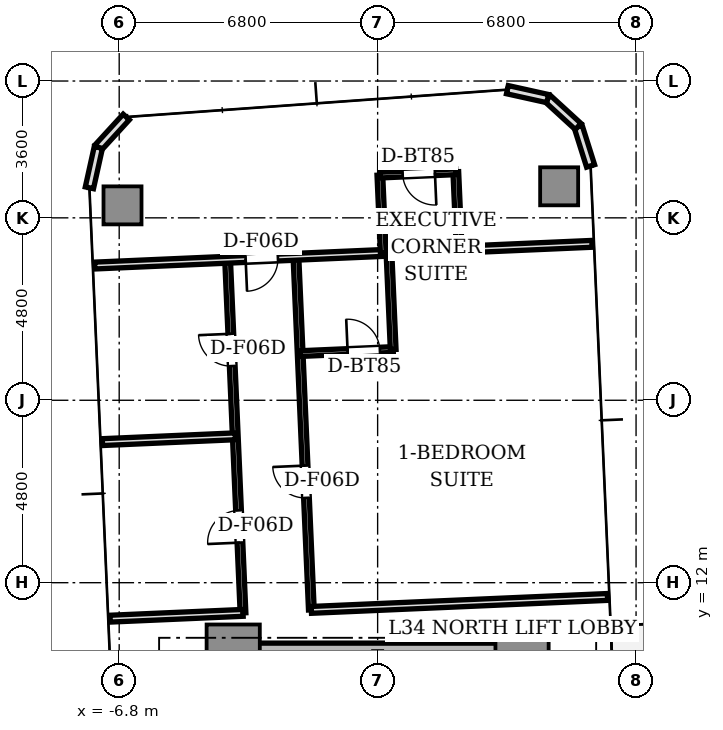
"""IFC4 building model, lengths in metres.
Left out: names, types, materials, properties, quantities, classifications, styles, units other than length and angle.
Written with IfcOpenShell. Run it as: python <this file> out.ifc"""

import sys

from ifc_helpers import new_model, si_unit, direction, frame, frame_2d, origin, origin_2d, place, context, subcontext, project, spatial, rectangle, extrude, source, transform, mapped, element, fill, save


model = new_model("IFC4")
c1 = context("Model", 3, precision=1e-05, world=origin(), true_north=direction((0.0, 1.0)))
c2 = subcontext(c1, "Body", "Model", "MODEL_VIEW")
j1 = project(units=[si_unit("LENGTHUNIT", "METRE"), si_unit("PLANEANGLEUNIT", "RADIAN")], contexts=[c1])
p1 = place(None, origin())
s1 = spatial("IfcSite", under=j1, at=p1, CompositionType="ELEMENT")
p2 = place(p1, origin())
s2 = spatial("IfcBuilding", under=s1, at=p2, CompositionType="ELEMENT")
p3 = place(p2, frame((0.0, 0.0, 124.85)))
s3 = spatial("IfcBuildingStorey", under=s2, at=p3, CompositionType="ELEMENT", Elevation=124.85)
p4 = place(p3, frame((-3.55, 10.2, 0.0), z_axis=(0.0, 0.0, 1.0), x_axis=(1.0, 0.0, 0.0)))
e1 = element("IfcWall", 1, at=p4, inside=s3, PredefinedType="SHEAR", context=c2, shape_type="SweptSolid", body=[
    extrude(rectangle(XDim=7.1, YDim=0.42, at=frame_2d((3.55, 0.0))), origin(), (0.0, 0.0, 1.0), 3.11),
])
m1 = source(origin(), c2, "Body", "SweptSolid", [
    extrude(rectangle(XDim=1.4, YDim=1.4, at=origin_2d()), origin(), (0.0, 0.0, 1.0), 3.11),
])
for number, where, z_axis, x_axis in (
    (2, (-3.8, 10.2, 0.0), (0.0, 0.0, 1.0), (1.0, 0.0, 0.0)),
    (3, (3.8, 10.2, 0.0), (0.0, 0.0, 1.0), (1.0, 0.0, 0.0)),
):
    element("IfcColumn", number, at=place(p3, frame(where, z_axis=z_axis, x_axis=x_axis)), inside=s3, PredefinedType="COLUMN", context=c2, shape_type="MappedRepresentation", body=[
        mapped(m1, transform((0.0, 0.0, 0.0), scale=1.0)),
    ])
m2 = source(origin(), c2, "Body", "SweptSolid", [
    extrude(rectangle(XDim=1.0, YDim=1.0, at=origin_2d()), origin(), (0.0, 0.0, 1.0), 3.11),
])
for number, where, z_axis, x_axis in (
    (4, (4.776, 22.43, 0.0), (0.0, 0.0, 1.0), (1.0, 0.0, 0.0)),
    (5, (-6.713, 21.928, 0.0), (0.0, 0.0, 1.0), (1.0, 0.0, 0.0)),
):
    element("IfcColumn", number, at=place(p3, frame(where, z_axis=z_axis, x_axis=x_axis)), inside=s3, PredefinedType="COLUMN", context=c2, shape_type="MappedRepresentation", body=[
        mapped(m2, transform((0.0, 0.0, 0.0), scale=1.0)),
    ])
p5 = place(p3, frame((5.604, 22.966, 0.0), z_axis=(0.0, 0.0, 1.0), x_axis=(-0.300755105707, 0.953701403161, 0.0)))
e6 = element("IfcWall", 6, at=p5, inside=s3, PredefinedType="STANDARD", context=c2, shape_type="SweptSolid", body=[
    extrude(rectangle(XDim=1.087, YDim=0.22, at=frame_2d((0.543, 0.0))), origin(), (0.0, 0.0, 1.0), 3.11),
])
p6 = place(p3, frame((5.277, 24.003, 0.0), z_axis=(0.0, 0.0, 1.0), x_axis=(-0.737312600672, 0.675551721847, 0.0)))
e7 = element("IfcWall", 7, at=p6, inside=s3, PredefinedType="STANDARD", context=c2, shape_type="SweptSolid", body=[
    extrude(rectangle(XDim=1.087, YDim=0.22, at=frame_2d((0.543, 0.0))), origin(), (0.0, 0.0, 1.0), 3.11),
])
for number, where, z_axis, x_axis in (
    (8, (4.475, 24.737, 0.0), (0.0, 0.0, 1.0), (-0.976, 0.217, 0.0)),
    (9, (-6.614, 24.253, 0.0), (0.0, 0.0, 1.0), (-0.676, -0.737, 0.0)),
):
    element("IfcWall", number, at=place(p3, frame(where, z_axis=z_axis, x_axis=x_axis)), inside=s3, PredefinedType="STANDARD", context=c2, shape_type="SweptSolid", body=[
        extrude(rectangle(XDim=1.087, YDim=0.22, at=frame_2d((0.543, 0.0))), origin(), (0.0, 0.0, 1.0), 3.11),
    ])
p7 = place(p3, frame((-7.349, 23.452, 0.0), z_axis=(0.0, 0.0, 1.0), x_axis=(-0.216454939174, -0.976292609471, 0.0)))
e10 = element("IfcWall", 10, at=p7, inside=s3, PredefinedType="STANDARD", context=c2, shape_type="SweptSolid", body=[
    extrude(rectangle(XDim=1.087, YDim=0.22, at=frame_2d((0.544, 0.0))), origin(), (0.0, 0.0, 1.0), 3.11),
])
p8 = place(p3, frame((-3.542, 11.206, 0.0), z_axis=(0.0, 0.0, 1.0), x_axis=(-0.043604692074, 0.999048863084, 0.0)))
e11 = element("IfcWall", 11, at=p8, inside=s3, PredefinedType="PARTITIONING", context=c2, shape_type="SweptSolid", body=[
    extrude(rectangle(XDim=9.3, YDim=0.15, at=frame_2d((4.65, 0.0))), origin(), (0.0, 0.0, 1.0), 2.66),
])
p9 = place(p8, frame((1.85, 0.0, 0.0)))
e12 = element("IfcOpeningElement", 12, at=p9, cuts=e11, PredefinedType="OPENING", context=c2, shape_type="SweptSolid", body=[
    extrude(rectangle(XDim=0.85, YDim=2.1, at=frame_2d((0.425, 1.05))), frame((0.0, 0.085, 0.0), z_axis=(0.0, -1.0, 0.0), x_axis=(1.0, 0.0, 0.0)), (0.0, 0.0, 1.0), 0.17),
])
p10 = place(p8, frame((6.5, 0.0, 0.0)))
e13 = element("IfcOpeningElement", 13, at=p10, cuts=e11, PredefinedType="OPENING", context=c2, shape_type="SweptSolid", body=[
    extrude(rectangle(XDim=0.85, YDim=2.1, at=frame_2d((0.425, 1.05))), frame((0.0, 0.085, 0.0), z_axis=(0.0, -1.0, 0.0), x_axis=(1.0, 0.0, 0.0)), (0.0, 0.0, 1.0), 0.17),
])
p11 = place(p3, frame((-1.744, 11.285, 0.0), z_axis=(0.0, 0.0, 1.0), x_axis=(-0.043630894187, 0.999047719117, 0.0)))
e14 = element("IfcWall", 14, at=p11, inside=s3, PredefinedType="PARTITIONING", context=c2, shape_type="SweptSolid", body=[
    extrude(rectangle(XDim=9.3, YDim=0.15, at=frame_2d((4.65, 0.0))), origin(), (0.0, 0.0, 1.0), 2.66),
])
p12 = place(p11, frame((2.95, 0.0, 0.0)))
e15 = element("IfcOpeningElement", 15, at=p12, cuts=e14, PredefinedType="OPENING", context=c2, shape_type="SweptSolid", body=[
    extrude(rectangle(XDim=0.85, YDim=2.1, at=frame_2d((0.425, 1.05))), frame((0.0, 0.085, 0.0), z_axis=(0.0, -1.0, 0.0), x_axis=(1.0, 0.0, 0.0)), (0.0, 0.0, 1.0), 0.17),
])
p13 = place(p3, frame((-3.542, 11.206, 0.0), z_axis=(0.0, 0.0, 1.0), x_axis=(-0.999046129111, -0.04366728647, 0.0)))
e16 = element("IfcWall", 16, at=p13, inside=s3, PredefinedType="PARTITIONING", context=c2, shape_type="SweptSolid", body=[
    extrude(rectangle(XDim=3.5, YDim=0.18, at=frame_2d((1.75, 0.0))), origin(), (0.0, 0.0, 1.0), 2.66),
])
p14 = place(p3, frame((6.049, 11.625, 0.0), z_axis=(0.0, 0.0, 1.0), x_axis=(-0.999047634936, -0.043632821702, 0.0)))
e17 = element("IfcWall", 17, at=p14, inside=s3, PredefinedType="PARTITIONING", context=c2, shape_type="SweptSolid", body=[
    extrude(rectangle(XDim=7.8, YDim=0.18, at=frame_2d((3.9, 0.0))), origin(), (0.0, 0.0, 1.0), 2.66),
])
p15 = place(p3, frame((-3.745, 15.852, 0.0), z_axis=(0.0, 0.0, 1.0), x_axis=(-0.999049169846, -0.043597663116, 0.0)))
e18 = element("IfcWall", 18, at=p15, inside=s3, PredefinedType="PARTITIONING", context=c2, shape_type="SweptSolid", body=[
    extrude(rectangle(XDim=3.5, YDim=0.18, at=frame_2d((1.75, 0.0))), origin(), (0.0, 0.0, 1.0), 2.66),
])
p16 = place(p3, frame((-2.038, 18.028, 0.0), z_axis=(0.0, 0.0, 1.0), x_axis=(0.999051263243, 0.043549666039, 0.0)))
e19 = element("IfcWall", 19, at=p16, inside=s3, PredefinedType="PARTITIONING", context=c2, shape_type="SweptSolid", body=[
    extrude(rectangle(XDim=2.45, YDim=0.15, at=frame_2d((1.225, 0.0))), origin(), (0.0, 0.0, 1.0), 2.66),
])
p17 = place(p16, frame((1.25, 0.0, 0.0)))
e20 = element("IfcOpeningElement", 20, at=p17, cuts=e19, PredefinedType="OPENING", context=c2, shape_type="SweptSolid", body=[
    extrude(rectangle(XDim=0.85, YDim=2.1, at=frame_2d((0.425, 1.05))), frame((0.0, 0.085, 0.0), z_axis=(0.0, -1.0, 0.0), x_axis=(1.0, 0.0, 0.0)), (0.0, 0.0, 1.0), 0.17),
])
p18 = place(p3, frame((0.409, 18.135, 0.0), z_axis=(0.0, 0.0, 1.0), x_axis=(-0.043561867058, 0.999050731314, 0.0)))
e21 = element("IfcWall", 21, at=p18, inside=s3, PredefinedType="PARTITIONING", context=c2, shape_type="SweptSolid", body=[
    extrude(rectangle(XDim=2.55, YDim=0.15, at=frame_2d((1.275, 0.0))), origin(), (0.0, 0.0, 1.0), 2.66),
])
p19 = place(p3, frame((5.643, 20.916, 0.0), z_axis=(0.0, 0.0, 1.0), x_axis=(-0.999047841598, -0.043628089563, 0.0)))
e22 = element("IfcWall", 22, at=p19, inside=s3, PredefinedType="PARTITIONING", context=c2, shape_type="SweptSolid", body=[
    extrude(rectangle(XDim=13.1, YDim=0.18, at=frame_2d((6.55, 0.0))), origin(), (0.0, 0.0, 1.0), 2.66),
])
p20 = place(p19, frame((8.275, 0.0, 0.0)))
e23 = element("IfcOpeningElement", 23, at=p20, cuts=e22, PredefinedType="OPENING", context=c2, shape_type="SweptSolid", body=[
    extrude(rectangle(XDim=0.85, YDim=2.1, at=frame_2d((0.425, 1.05))), frame((0.0, 0.1, 0.0), z_axis=(0.0, -1.0, 0.0), x_axis=(1.0, 0.0, 0.0)), (0.0, 0.0, 1.0), 0.2),
])
p21 = place(p3, frame((0.148, 20.676, 0.0), z_axis=(0.0, 0.0, 1.0), x_axis=(-0.043587097972, 0.999049630844, 0.0)))
e24 = element("IfcWall", 24, at=p21, inside=s3, PredefinedType="PARTITIONING", context=c2, shape_type="SweptSolid", body=[
    extrude(rectangle(XDim=2.05, YDim=0.15, at=frame_2d((1.025, 0.0))), origin(), (0.0, 0.0, 1.0), 2.66),
])
p22 = place(p3, frame((2.146, 20.763, 0.0), z_axis=(0.0, 0.0, 1.0), x_axis=(-0.043711161805, 0.9990442104, 0.0)))
e25 = element("IfcWall", 25, at=p22, inside=s3, PredefinedType="PARTITIONING", context=c2, shape_type="SweptSolid", body=[
    extrude(rectangle(XDim=2.05, YDim=0.15, at=frame_2d((1.025, 0.0))), origin(), (0.0, 0.0, 1.0), 2.66),
])
p23 = place(p3, frame((2.057, 22.811, 0.0), z_axis=(0.0, 0.0, 1.0), x_axis=(-0.999049929275, -0.043580257179, 0.0)))
e26 = element("IfcWall", 26, at=p23, inside=s3, PredefinedType="PARTITIONING", context=c2, shape_type="SweptSolid", body=[
    extrude(rectangle(XDim=2.0, YDim=0.15, at=frame_2d((1.0, 0.0))), origin(), (0.0, 0.0, 1.0), 2.66),
])
p24 = place(p23, frame((0.55, 0.0, 0.0)))
e27 = element("IfcOpeningElement", 27, at=p24, cuts=e26, PredefinedType="OPENING", context=c2, shape_type="SweptSolid", body=[
    extrude(rectangle(XDim=0.85, YDim=2.1, at=frame_2d((0.425, 1.05))), frame((0.0, 0.085, 0.0), z_axis=(0.0, -1.0, 0.0), x_axis=(1.0, 0.0, 0.0)), (0.0, 0.0, 1.0), 0.17),
])
m3 = source(origin(), c2, "Body", "SweptSolid", [
    extrude(rectangle(XDim=0.85, YDim=0.05, at=origin_2d()), origin(), (0.0, 0.0, 1.0), 2.1),
])
p25 = place(p9, frame((0.425, 0.0, 0.0)))
e28 = element("IfcDoor", 28, at=p25, inside=s3, OperationType="SINGLE_SWING_LEFT", PredefinedType="DOOR", context=c2, shape_type="MappedRepresentation", body=[
    mapped(m3, transform((0.0, 0.0, 0.0), scale=1.0)),
])
fill(e12, e28)
p26 = place(p10, frame((0.425, 0.0, 0.0)))
e29 = element("IfcDoor", 29, at=p26, inside=s3, OperationType="SINGLE_SWING_RIGHT", PredefinedType="DOOR", context=c2, shape_type="MappedRepresentation", body=[
    mapped(m3, transform((0.0, 0.0, 0.0), scale=1.0)),
])
fill(e13, e29)
p27 = place(p17, frame((0.425, 0.0, 0.0)))
e30 = element("IfcDoor", 30, at=p27, inside=s3, OperationType="SINGLE_SWING_LEFT", PredefinedType="DOOR", context=c2, shape_type="MappedRepresentation", body=[
    mapped(m3, transform((0.0, 0.0, 0.0), scale=1.0)),
])
fill(e20, e30)
p28 = place(p12, frame((0.425, 0.0, 0.0)))
e31 = element("IfcDoor", 31, at=p28, inside=s3, OperationType="SINGLE_SWING_RIGHT", PredefinedType="DOOR", context=c2, shape_type="MappedRepresentation", body=[
    mapped(m3, transform((0.0, 0.0, 0.0), scale=1.0)),
])
fill(e15, e31)
p29 = place(p24, frame((0.425, 0.0, 0.0)))
e32 = element("IfcDoor", 32, at=p29, inside=s3, OperationType="SINGLE_SWING_LEFT", PredefinedType="DOOR", context=c2, shape_type="MappedRepresentation", body=[
    mapped(m3, transform((0.0, 0.0, 0.0), scale=1.0)),
])
fill(e27, e32)
p30 = place(p20, frame((0.425, 0.0, 0.0)))
e33 = element("IfcDoor", 33, at=p30, inside=s3, OperationType="SINGLE_SWING_RIGHT", PredefinedType="DOOR", context=c2, shape_type="MappedRepresentation", body=[
    mapped(m3, transform((0.0, 0.0, 0.0), scale=1.0)),
])
fill(e23, e33)
save(model, sys.argv[1])
